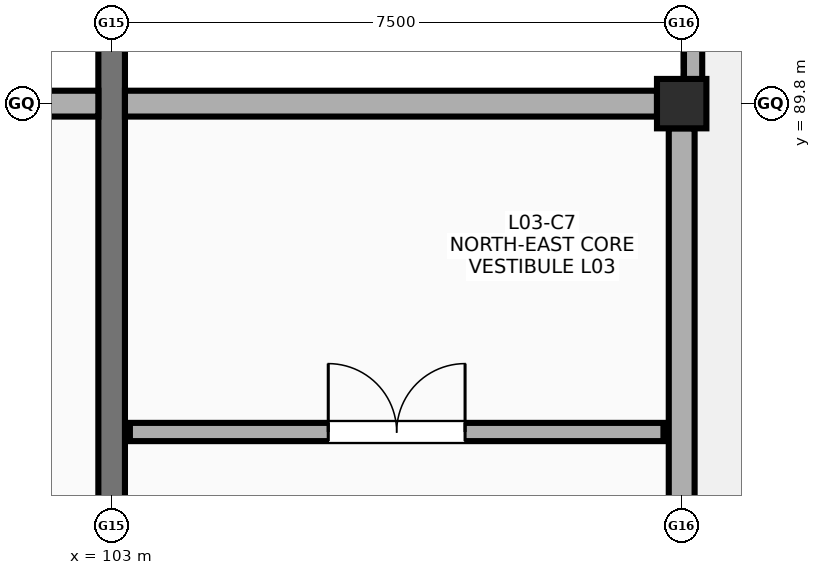
"""IFC4 building model, lengths in metres.
Left out: names, types, materials, properties, quantities, classifications, styles, units other than length and angle.
Written with IfcOpenShell. Run it as: python <this file> out.ifc"""

import sys

from ifc_helpers import new_model, si_unit, direction, frame, frame_2d, origin, origin_2d, place, context, subcontext, project, spatial, rectangle, extrude, element, fill, save


model = new_model("IFC4")
c1 = context("Model", 3, precision=1e-05, world=origin(), true_north=direction((0.0, 1.0)))
c2 = subcontext(c1, "Body", "Model", "MODEL_VIEW")
j1 = project(units=[si_unit("LENGTHUNIT", "METRE"), si_unit("PLANEANGLEUNIT", "RADIAN")], contexts=[c1])
p1 = place(None, origin())
s1 = spatial("IfcSite", under=j1, at=p1, CompositionType="ELEMENT")
p2 = place(p1, origin())
s2 = spatial("IfcBuilding", under=s1, at=p2, CompositionType="ELEMENT")
p3 = place(p2, frame((0.0, 0.0, 14.2)))
s3 = spatial("IfcBuildingStorey", under=s2, at=p3, CompositionType="ELEMENT", Elevation=14.2)
p4 = place(p3, frame((110.5, 89.8, 0.0), z_axis=(0.0, 0.0, 1.0), x_axis=(1.0, 0.0, 0.0)))
e1 = element("IfcColumn", 1, at=p4, inside=s3, PredefinedType="COLUMN", context=c2, shape_type="SweptSolid", body=[
    extrude(rectangle(XDim=0.65, YDim=0.65, at=origin_2d()), origin(), (0.0, 0.0, 1.0), 3.8),
])
p5 = place(p3, frame((103.0, 73.09, 0.0), z_axis=(0.0, 0.0, 1.0), x_axis=(0.0, 1.0, 0.0)))
e2 = element("IfcWall", 2, at=p5, inside=s3, PredefinedType="SHEAR", context=c2, shape_type="SweptSolid", body=[
    extrude(rectangle(XDim=25.02, YDim=0.35, at=frame_2d((12.51, 0.0))), origin(), (0.0, 0.0, 1.0), 3.8),
])
p6 = place(p3, frame((73.175, 89.8, 0.0), z_axis=(0.0, 0.0, 1.0), x_axis=(1.0, 0.0, 0.0)))
e3 = element("IfcWall", 3, at=p6, inside=s3, PredefinedType="SOLIDWALL", context=c2, shape_type="SweptSolid", body=[
    extrude(rectangle(XDim=29.65, YDim=0.34, at=frame_2d((14.825, 0.0))), origin(), (0.0, 0.0, 1.0), 2.35),
])
p7 = place(p3, frame((103.175, 89.8, 0.0), z_axis=(0.0, 0.0, 1.0), x_axis=(1.0, 0.0, 0.0)))
e4 = element("IfcWall", 4, at=p7, inside=s3, PredefinedType="SOLIDWALL", context=c2, shape_type="SweptSolid", body=[
    extrude(rectangle(XDim=7.0, YDim=0.34, at=frame_2d((3.5, 0.0))), origin(), (0.0, 0.0, 1.0), 2.35),
])
p8 = place(p3, frame((110.5, 81.525, 0.0), z_axis=(0.0, 0.0, 1.0), x_axis=(0.0, 1.0, 0.0)))
e5 = element("IfcWall", 5, at=p8, inside=s3, PredefinedType="SOLIDWALL", context=c2, shape_type="SweptSolid", body=[
    extrude(rectangle(XDim=7.95, YDim=0.34, at=frame_2d((3.975, 0.0))), origin(), (0.0, 0.0, 1.0), 2.35),
])
p9 = place(p3, frame((103.24, 85.48, 0.0), z_axis=(0.0, 0.0, 1.0), x_axis=(1.0, 0.0, 0.0)))
e6 = element("IfcWall", 6, at=p9, inside=s3, PredefinedType="SOLIDWALL", context=c2, shape_type="SweptSolid", body=[
    extrude(rectangle(XDim=7.02, YDim=0.24, at=frame_2d((3.51, 0.0))), origin(), (0.0, 0.0, 1.0), 2.7),
])
p10 = place(p9, frame((2.61, 0.0, 0.0)))
e7 = element("IfcOpeningElement", 7, at=p10, cuts=e6, PredefinedType="OPENING", context=c2, shape_type="SweptSolid", body=[
    extrude(rectangle(XDim=1.8, YDim=2.18, at=frame_2d((0.9, 1.09))), frame((0.0, 0.13, 0.0), z_axis=(0.0, -1.0, 0.0), x_axis=(1.0, 0.0, 0.0)), (0.0, 0.0, 1.0), 0.26),
])
p11 = place(p3, frame((110.65, 89.495, 0.0), z_axis=(0.0, 0.0, 1.0), x_axis=(0.0, 1.0, 0.0)))
e8 = element("IfcWall", 8, at=p11, inside=s3, PredefinedType="PARAPET", context=c2, shape_type="SweptSolid", body=[
    extrude(rectangle(XDim=8.705, YDim=0.24, at=frame_2d((4.353, 0.0))), origin(), (0.0, 0.0, 1.0), 0.65),
])
p12 = place(p10, origin())
e9 = element("IfcDoor", 9, at=p12, inside=s3, OperationType="DOUBLE_DOOR_SINGLE_SWING", PredefinedType="DOOR", context=c2, shape_type="SweptSolid", body=[
    extrude(rectangle(XDim=1.8, YDim=2.18, at=frame_2d((0.9, 1.09))), frame((0.0, 0.025, 0.0), z_axis=(0.0, -1.0, 0.0), x_axis=(1.0, 0.0, 0.0)), (0.0, 0.0, 1.0), 0.05),
])
fill(e7, e9)
save(model, sys.argv[1])
